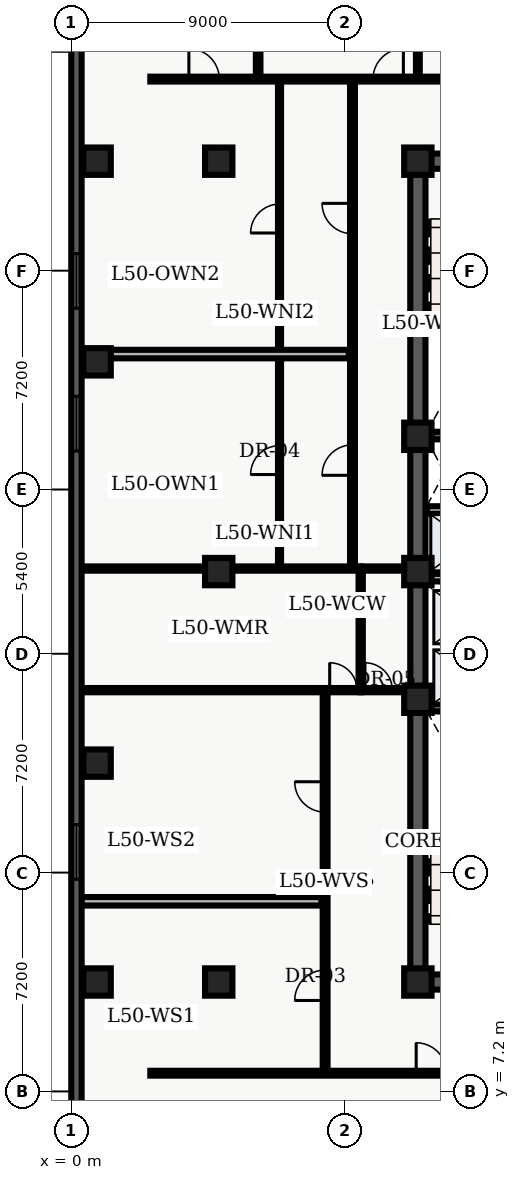
"""IFC4 building model, lengths in metres.
Left out: names, types, materials, properties, quantities, classifications, styles, units other than length and angle.
Written with IfcOpenShell. Run it as: python <this file> out.ifc"""

import sys

from ifc_helpers import new_model, entity, si_unit, converted_unit, direction, frame, origin_with_axes, origin_2d_with_axis, place, context, subcontext, project, spatial, polyline, rectangle, outline, extrude, element, fill, save


model = new_model("IFC4")
c1 = context("Model", 3, precision=1e-05, world=origin_with_axes(), true_north=direction((0.0, 1.0)))
c2 = subcontext(c1, "Body", "Model", "MODEL_VIEW")
j1 = project(units=[si_unit("LENGTHUNIT", "METRE"), converted_unit("PLANEANGLEUNIT", "DEGREE", entity("IfcPlaneAngleMeasure", 0.017), si_unit("PLANEANGLEUNIT", "RADIAN"), dimensions=[0, 0, 0, 0, 0, 0, 0])], contexts=[c1])
p1 = place(None, origin_with_axes())
s1 = spatial("IfcSite", under=j1, at=p1, CompositionType="ELEMENT")
p2 = place(p1, origin_with_axes())
s2 = spatial("IfcBuilding", under=s1, at=p2, CompositionType="ELEMENT")
p3 = place(p2, frame((0.0, 0.0, 204.3), z_axis=(0.0, 0.0, 1.0), x_axis=(1.0, 0.0, 0.0)))
s3 = spatial("IfcBuildingStorey", under=s2, at=p3, CompositionType="ELEMENT", Elevation=204.3)
p4 = place(p3, frame((11.4, 10.8, 0.0), z_axis=(0.0, 0.0, 1.0), x_axis=(0.0, 1.0, 0.0)))
e1 = element("IfcWall", 1, at=p4, inside=s3, PredefinedType="SHEAR", context=c2, shape_type="SweptSolid", body=[
    extrude(outline(polyline([(0.0, -0.25), (27.0, -0.25), (27.0, 0.25), (0.0, 0.25), (0.0, -0.25)])), origin_with_axes(), (0.0, 0.0, 1.0), 3.66),
])
p5 = place(p3, frame((11.4, 10.8, 0.0), z_axis=(0.0, 0.0, 1.0), x_axis=(1.0, 0.0, 0.0)))
e2 = element("IfcWall", 2, at=p5, inside=s3, PredefinedType="SHEAR", context=c2, shape_type="SweptSolid", body=[
    extrude(outline(polyline([(0.0, -0.25), (7.2, -0.25), (7.2, 0.25), (0.0, 0.25), (0.0, -0.25)])), origin_with_axes(), (0.0, 0.0, 1.0), 3.66),
])
p6 = place(p5, frame((2.625, 0.0, 0.0), z_axis=(0.0, 0.0, 1.0), x_axis=(1.0, 0.0, 0.0)))
e3 = element("IfcOpeningElement", 3, at=p6, cuts=e2, PredefinedType="OPENING", context=c2, shape_type="SweptSolid", body=[
    extrude(rectangle(XDim=1.05, YDim=0.52, at=origin_2d_with_axis()), origin_with_axes(), (0.0, 0.0, 1.0), 2.15),
])
p7 = place(p3, frame((11.4, 37.8, 0.0), z_axis=(0.0, 0.0, 1.0), x_axis=(1.0, 0.0, 0.0)))
e4 = element("IfcWall", 4, at=p7, inside=s3, PredefinedType="SHEAR", context=c2, shape_type="SweptSolid", body=[
    extrude(outline(polyline([(0.0, -0.25), (7.2, -0.25), (7.2, 0.25), (0.0, 0.25), (0.0, -0.25)])), origin_with_axes(), (0.0, 0.0, 1.0), 3.66),
])
p8 = place(p7, frame((2.625, 0.0, 0.0), z_axis=(0.0, 0.0, 1.0), x_axis=(1.0, 0.0, 0.0)))
e5 = element("IfcOpeningElement", 5, at=p8, cuts=e4, PredefinedType="OPENING", context=c2, shape_type="SweptSolid", body=[
    extrude(rectangle(XDim=1.05, YDim=0.52, at=origin_2d_with_axis()), origin_with_axes(), (0.0, 0.0, 1.0), 2.15),
])
for number, where, z_axis, x_axis in (
    (6, (11.65, 19.825, 0.0), (0.0, 0.0, 1.0), (1.0, 0.0, 0.0)),
    (7, (11.65, 28.775, 0.0), (0.0, 0.0, 1.0), (1.0, 0.0, 0.0)),
):
    element("IfcWall", number, at=place(p3, frame(where, z_axis=z_axis, x_axis=x_axis)), inside=s3, PredefinedType="SHEAR", context=c2, shape_type="SweptSolid", body=[
        extrude(outline(polyline([(0.0, -0.125), (6.7, -0.125), (6.7, 0.125), (0.0, 0.125), (0.0, -0.125)])), origin_with_axes(), (0.0, 0.0, 1.0), 3.66),
    ])
p9 = place(p3, frame((11.7, 24.1, 0.0), z_axis=(0.0, 0.0, 1.0), x_axis=(1.0, 0.0, 0.0)))
e8 = element("IfcWall", 8, at=p9, inside=s3, PredefinedType="SOLIDWALL", context=c2, shape_type="SweptSolid", body=[
    extrude(outline(polyline([(0.0, -0.125), (6.6, -0.125), (6.6, 0.125), (0.0, 0.125), (0.0, -0.125)])), origin_with_axes(), (0.0, 0.0, 1.0), 2.7),
])
p10 = place(p9, frame((3.6, 0.0, 0.0), z_axis=(0.0, 0.0, 1.0), x_axis=(1.0, 0.0, 0.0)))
e9 = element("IfcOpeningElement", 9, at=p10, cuts=e8, PredefinedType="OPENING", context=c2, shape_type="SweptSolid", body=[
    extrude(rectangle(XDim=0.9, YDim=0.27, at=origin_2d_with_axis()), origin_with_axes(), (0.0, 0.0, 1.0), 2.15),
])
p11 = place(p9, frame((5.65, 0.0, 0.0), z_axis=(0.0, 0.0, 1.0), x_axis=(1.0, 0.0, 0.0)))
e10 = element("IfcOpeningElement", 10, at=p11, cuts=e8, PredefinedType="OPENING", context=c2, shape_type="SweptSolid", body=[
    extrude(rectangle(XDim=0.9, YDim=0.27, at=origin_2d_with_axis()), origin_with_axes(), (0.0, 0.0, 1.0), 2.15),
])
p12 = place(p3, frame((11.7, 26.325, 0.0), z_axis=(0.0, 0.0, 1.0), x_axis=(1.0, 0.0, 0.0)))
e11 = element("IfcWall", 11, at=p12, inside=s3, PredefinedType="SOLIDWALL", context=c2, shape_type="SweptSolid", body=[
    extrude(outline(polyline([(0.0, -0.125), (6.6, -0.125), (6.6, 0.125), (0.0, 0.125), (0.0, -0.125)])), origin_with_axes(), (0.0, 0.0, 1.0), 2.7),
])
p13 = place(p12, frame((3.5, 0.0, 0.0), z_axis=(0.0, 0.0, 1.0), x_axis=(1.0, 0.0, 0.0)))
e12 = element("IfcOpeningElement", 12, at=p13, cuts=e11, PredefinedType="OPENING", context=c2, shape_type="SweptSolid", body=[
    extrude(rectangle(XDim=0.9, YDim=0.27, at=origin_2d_with_axis()), origin_with_axes(), (0.0, 0.0, 1.0), 2.15),
])
for number, where, z_axis, x_axis in (
    (13, (11.4, 10.8, 0.0), (0.0, 0.0, 1.0), (1.0, 0.0, 0.0)),
    (14, (11.4, 20.1, 0.0), (0.0, 0.0, 1.0), (1.0, 0.0, 0.0)),
    (15, (11.4, 24.3, 0.0), (0.0, 0.0, 1.0), (1.0, 0.0, 0.0)),
    (16, (11.4, 28.75, 0.0), (0.0, 0.0, 1.0), (1.0, 0.0, 0.0)),
    (17, (11.4, 37.8, 0.0), (0.0, 0.0, 1.0), (1.0, 0.0, 0.0)),
    (18, (4.85, 10.8, 0.0), (0.0, 0.0, 1.0), (1.0, 0.0, 0.0)),
    (19, (4.85, 24.3, 0.0), (0.0, 0.0, 1.0), (1.0, 0.0, 0.0)),
    (20, (4.85, 37.8, 0.0), (0.0, 0.0, 1.0), (1.0, 0.0, 0.0)),
    (21, (0.85, 10.8, 0.0), (0.0, 0.0, 1.0), (1.0, 0.0, 0.0)),
    (22, (0.85, 18.0, 0.0), (0.0, 0.0, 1.0), (1.0, 0.0, 0.0)),
    (23, (0.85, 31.2, 0.0), (0.0, 0.0, 1.0), (1.0, 0.0, 0.0)),
    (24, (0.85, 37.8, 0.0), (0.0, 0.0, 1.0), (1.0, 0.0, 0.0)),
):
    element("IfcColumn", number, at=place(p3, frame(where, z_axis=z_axis, x_axis=x_axis)), inside=s3, PredefinedType="COLUMN", context=c2, shape_type="SweptSolid", body=[
        extrude(rectangle(XDim=0.9, YDim=0.9, at=origin_2d_with_axis()), origin_with_axes(), (0.0, 0.0, 1.0), 3.9),
    ])
p14 = place(p3, frame((9.52, 20.4, 0.0), z_axis=(0.0, 0.0, 1.0), x_axis=(0.0, 1.0, 0.0)))
e25 = element("IfcWall", 25, at=p14, inside=s3, PredefinedType="PARTITIONING", context=c2, shape_type="SweptSolid", body=[
    extrude(outline(polyline([(0.0, -0.07), (4.0, -0.07), (4.0, 0.07), (0.0, 0.07), (0.0, -0.07)])), origin_with_axes(), (0.0, 0.0, 1.0), 2.7),
])
p15 = place(p3, frame((9.52, 20.4, 0.0), z_axis=(0.0, 0.0, 1.0), x_axis=(1.0, 0.0, 0.0)))
e26 = element("IfcWall", 26, at=p15, inside=s3, PredefinedType="PARTITIONING", context=c2, shape_type="SweptSolid", body=[
    extrude(outline(polyline([(0.0, -0.07), (1.58, -0.07), (1.58, 0.07), (0.0, 0.07), (0.0, -0.07)])), origin_with_axes(), (0.0, 0.0, 1.0), 2.7),
])
p16 = place(p15, frame((0.59, 0.0, 0.0), z_axis=(0.0, 0.0, 1.0), x_axis=(1.0, 0.0, 0.0)))
e27 = element("IfcOpeningElement", 27, at=p16, cuts=e26, PredefinedType="OPENING", context=c2, shape_type="SweptSolid", body=[
    extrude(rectangle(XDim=0.9, YDim=0.16, at=origin_2d_with_axis()), origin_with_axes(), (0.0, 0.0, 1.0), 2.15),
])
p17 = place(p3, frame((9.52, 24.4, 0.0), z_axis=(0.0, 0.0, 1.0), x_axis=(1.0, 0.0, 0.0)))
e28 = element("IfcWall", 28, at=p17, inside=s3, PredefinedType="PARTITIONING", context=c2, shape_type="SweptSolid", body=[
    extrude(outline(polyline([(0.0, -0.07), (1.58, -0.07), (1.58, 0.07), (0.0, 0.07), (0.0, -0.07)])), origin_with_axes(), (0.0, 0.0, 1.0), 2.7),
])
p18 = place(p3, frame((2.6, 7.8, 0.0), z_axis=(0.0, 0.0, 1.0), x_axis=(1.0, 0.0, 0.0)))
e29 = element("IfcWall", 29, at=p18, inside=s3, PredefinedType="PARTITIONING", context=c2, shape_type="SweptSolid", body=[
    extrude(outline(polyline([(0.0, -0.08), (18.55, -0.08), (18.55, 0.08), (0.0, 0.08), (0.0, -0.08)])), origin_with_axes(), (0.0, 0.0, 1.0), 2.7),
])
p19 = place(p18, frame((9.245, 0.0, 0.0), z_axis=(0.0, 0.0, 1.0), x_axis=(1.0, 0.0, 0.0)))
e30 = element("IfcOpeningElement", 30, at=p19, cuts=e29, PredefinedType="OPENING", context=c2, shape_type="SweptSolid", body=[
    extrude(rectangle(XDim=1.0, YDim=0.18, at=origin_2d_with_axis()), origin_with_axes(), (0.0, 0.0, 1.0), 2.15),
])
p20 = place(p3, frame((2.6, 40.5, 0.0), z_axis=(0.0, 0.0, 1.0), x_axis=(1.0, 0.0, 0.0)))
e31 = element("IfcWall", 31, at=p20, inside=s3, PredefinedType="PARTITIONING", context=c2, shape_type="SweptSolid", body=[
    extrude(outline(polyline([(0.0, -0.08), (26.946, -0.08), (26.946, 0.08), (0.0, 0.08), (0.0, -0.08)])), origin_with_axes(), (0.0, 0.0, 1.0), 2.7),
])
p21 = place(p20, frame((1.768, 0.0, 0.0), z_axis=(0.0, 0.0, 1.0), x_axis=(1.0, 0.0, 0.0)))
e32 = element("IfcOpeningElement", 32, at=p21, cuts=e31, PredefinedType="OPENING", context=c2, shape_type="SweptSolid", body=[
    extrude(rectangle(XDim=1.0, YDim=0.18, at=origin_2d_with_axis()), origin_with_axes(), (0.0, 0.0, 1.0), 2.15),
])
p22 = place(p20, frame((7.824, 0.0, 0.0), z_axis=(0.0, 0.0, 1.0), x_axis=(1.0, 0.0, 0.0)))
e33 = element("IfcOpeningElement", 33, at=p22, cuts=e31, PredefinedType="OPENING", context=c2, shape_type="SweptSolid", body=[
    extrude(rectangle(XDim=1.0, YDim=0.18, at=origin_2d_with_axis()), origin_with_axes(), (0.0, 0.0, 1.0), 2.15),
])
p23 = place(p20, frame((10.411, 0.0, 0.0), z_axis=(0.0, 0.0, 1.0), x_axis=(1.0, 0.0, 0.0)))
e34 = element("IfcOpeningElement", 34, at=p23, cuts=e31, PredefinedType="OPENING", context=c2, shape_type="SweptSolid", body=[
    extrude(rectangle(XDim=1.0, YDim=0.18, at=origin_2d_with_axis()), origin_with_axes(), (0.0, 0.0, 1.0), 2.15),
])
p24 = place(p20, frame((14.771, 0.0, 0.0), z_axis=(0.0, 0.0, 1.0), x_axis=(1.0, 0.0, 0.0)))
e35 = element("IfcOpeningElement", 35, at=p24, cuts=e31, PredefinedType="OPENING", context=c2, shape_type="SweptSolid", body=[
    extrude(rectangle(XDim=1.0, YDim=0.18, at=origin_2d_with_axis()), origin_with_axes(), (0.0, 0.0, 1.0), 2.15),
])
p25 = place(p3, frame((8.35, 7.8, 0.0), z_axis=(0.0, 0.0, 1.0), x_axis=(0.0, 1.0, 0.0)))
e36 = element("IfcWall", 36, at=p25, inside=s3, PredefinedType="PARTITIONING", context=c2, shape_type="SweptSolid", body=[
    extrude(outline(polyline([(0.0, -0.08), (12.6, -0.08), (12.6, 0.08), (0.0, 0.08), (0.0, -0.08)])), origin_with_axes(), (0.0, 0.0, 1.0), 2.7),
])
p26 = place(p25, frame((2.893, 0.0, 0.0), z_axis=(0.0, 0.0, 1.0), x_axis=(1.0, 0.0, 0.0)))
e37 = element("IfcOpeningElement", 37, at=p26, cuts=e36, PredefinedType="OPENING", context=c2, shape_type="SweptSolid", body=[
    extrude(rectangle(XDim=1.0, YDim=0.18, at=origin_2d_with_axis()), origin_with_axes(), (0.0, 0.0, 1.0), 2.15),
])
p27 = place(p25, frame((9.088, 0.0, 0.0), z_axis=(0.0, 0.0, 1.0), x_axis=(1.0, 0.0, 0.0)))
e38 = element("IfcOpeningElement", 38, at=p27, cuts=e36, PredefinedType="OPENING", context=c2, shape_type="SweptSolid", body=[
    extrude(rectangle(XDim=1.0, YDim=0.18, at=origin_2d_with_axis()), origin_with_axes(), (0.0, 0.0, 1.0), 2.15),
])
p28 = place(p3, frame((9.25, 24.4, 0.0), z_axis=(0.0, 0.0, 1.0), x_axis=(0.0, 1.0, 0.0)))
e39 = element("IfcWall", 39, at=p28, inside=s3, PredefinedType="PARTITIONING", context=c2, shape_type="SweptSolid", body=[
    extrude(outline(polyline([(0.0, -0.08), (16.1, -0.08), (16.1, 0.08), (0.0, 0.08), (0.0, -0.08)])), origin_with_axes(), (0.0, 0.0, 1.0), 2.7),
])
p29 = place(p28, frame((3.567, 0.0, 0.0), z_axis=(0.0, 0.0, 1.0), x_axis=(1.0, 0.0, 0.0)))
e40 = element("IfcOpeningElement", 40, at=p29, cuts=e39, PredefinedType="OPENING", context=c2, shape_type="SweptSolid", body=[
    extrude(rectangle(XDim=1.0, YDim=0.18, at=origin_2d_with_axis()), origin_with_axes(), (0.0, 0.0, 1.0), 2.15),
])
p30 = place(p28, frame((11.512, 0.0, 0.0), z_axis=(0.0, 0.0, 1.0), x_axis=(1.0, 0.0, 0.0)))
e41 = element("IfcOpeningElement", 41, at=p30, cuts=e39, PredefinedType="OPENING", context=c2, shape_type="SweptSolid", body=[
    extrude(rectangle(XDim=1.0, YDim=0.18, at=origin_2d_with_axis()), origin_with_axes(), (0.0, 0.0, 1.0), 2.15),
])
p31 = place(p3, frame((0.335, 20.4, 0.0), z_axis=(0.0, 0.0, 1.0), x_axis=(1.0, 0.0, 0.0)))
e42 = element("IfcWall", 42, at=p31, inside=s3, PredefinedType="PARTITIONING", context=c2, shape_type="SweptSolid", body=[
    extrude(outline(polyline([(0.0, -0.07), (9.185, -0.07), (9.185, 0.07), (0.0, 0.07), (0.0, -0.07)])), origin_with_axes(), (0.0, 0.0, 1.0), 2.7),
])
p32 = place(p31, frame((8.615, 0.0, 0.0), z_axis=(0.0, 0.0, 1.0), x_axis=(1.0, 0.0, 0.0)))
e43 = element("IfcOpeningElement", 43, at=p32, cuts=e42, PredefinedType="OPENING", context=c2, shape_type="SweptSolid", body=[
    extrude(rectangle(XDim=0.9, YDim=0.16, at=origin_2d_with_axis()), origin_with_axes(), (0.0, 0.0, 1.0), 2.15),
])
p33 = place(p3, frame((0.335, 24.4, 0.0), z_axis=(0.0, 0.0, 1.0), x_axis=(1.0, 0.0, 0.0)))
e44 = element("IfcWall", 44, at=p33, inside=s3, PredefinedType="PARTITIONING", context=c2, shape_type="SweptSolid", body=[
    extrude(outline(polyline([(0.0, -0.07), (9.185, -0.07), (9.185, 0.07), (0.0, 0.07), (0.0, -0.07)])), origin_with_axes(), (0.0, 0.0, 1.0), 2.7),
])
p34 = place(p3, frame((0.335, 13.455, 0.0), z_axis=(0.0, 0.0, 1.0), x_axis=(1.0, 0.0, 0.0)))
e45 = element("IfcWall", 45, at=p34, inside=s3, PredefinedType="PARTITIONING", context=c2, shape_type="SweptSolid", body=[
    extrude(outline(polyline([(0.0, -0.14), (7.895, -0.14), (7.895, 0.14), (0.0, 0.14), (0.0, -0.14)])), origin_with_axes(), (0.0, 0.0, 1.0), 2.7),
])
p35 = place(p3, frame((6.85, 24.55, 0.0), z_axis=(0.0, 0.0, 1.0), x_axis=(0.0, 1.0, 0.0)))
e46 = element("IfcWall", 46, at=p35, inside=s3, PredefinedType="PARTITIONING", context=c2, shape_type="SweptSolid", body=[
    extrude(outline(polyline([(0.0, -0.05), (15.75, -0.05), (15.75, 0.05), (0.0, 0.05), (0.0, -0.05)])), origin_with_axes(), (0.0, 0.0, 1.0), 2.7),
])
p36 = place(p35, frame((3.417, 0.0, 0.0), z_axis=(0.0, 0.0, 1.0), x_axis=(1.0, 0.0, 0.0)))
e47 = element("IfcOpeningElement", 47, at=p36, cuts=e46, PredefinedType="OPENING", context=c2, shape_type="SweptSolid", body=[
    extrude(rectangle(XDim=0.95, YDim=0.12, at=origin_2d_with_axis()), origin_with_axes(), (0.0, 0.0, 1.0), 2.15),
])
p37 = place(p35, frame((11.363, 0.0, 0.0), z_axis=(0.0, 0.0, 1.0), x_axis=(1.0, 0.0, 0.0)))
e48 = element("IfcOpeningElement", 48, at=p37, cuts=e46, PredefinedType="OPENING", context=c2, shape_type="SweptSolid", body=[
    extrude(rectangle(XDim=0.95, YDim=0.12, at=origin_2d_with_axis()), origin_with_axes(), (0.0, 0.0, 1.0), 2.15),
])
p38 = place(p3, frame((0.335, 31.455, 0.0), z_axis=(0.0, 0.0, 1.0), x_axis=(1.0, 0.0, 0.0)))
e49 = element("IfcWall", 49, at=p38, inside=s3, PredefinedType="PARTITIONING", context=c2, shape_type="SweptSolid", body=[
    extrude(outline(polyline([(0.0, -0.14), (8.795, -0.14), (8.795, 0.14), (0.0, 0.14), (0.0, -0.14)])), origin_with_axes(), (0.0, 0.0, 1.0), 2.7),
])
p39 = place(p3, frame((6.147, 40.6, 0.0), z_axis=(0.0, 0.0, 1.0), x_axis=(0.0, 1.0, 0.0)))
e50 = element("IfcWall", 50, at=p39, inside=s3, PredefinedType="PARTITIONING", context=c2, shape_type="SweptSolid", body=[
    extrude(outline(polyline([(0.0, -0.075), (7.665, -0.075), (7.665, 0.075), (0.0, 0.075), (0.0, -0.075)])), origin_with_axes(), (0.0, 0.0, 1.0), 2.7),
])
p40 = place(p3, frame((11.4, 40.6, 0.0), z_axis=(0.0, 0.0, 1.0), x_axis=(0.0, 1.0, 0.0)))
e51 = element("IfcWall", 51, at=p40, inside=s3, PredefinedType="PARTITIONING", context=c2, shape_type="SweptSolid", body=[
    extrude(outline(polyline([(0.0, -0.062), (7.665, -0.062), (7.665, 0.062), (0.0, 0.062), (0.0, -0.062)])), origin_with_axes(), (0.0, 0.0, 1.0), 2.7),
])
p41 = place(p3, frame((0.17, 2.74, 0.0), z_axis=(0.0, 0.0, 1.0), x_axis=(0.0, 1.0, 0.0)))
e52 = element("IfcWall", 52, at=p41, inside=s3, PredefinedType="SOLIDWALL", context=c2, shape_type="SweptSolid", body=[
    extrude(outline(polyline([(0.0, -0.17), (43.46, -0.17), (43.46, 0.17), (0.0, 0.17), (0.0, -0.17)])), origin_with_axes(), (0.0, 0.0, 1.0), 3.66),
])
p42 = place(p41, frame((2.948, 0.0, 0.45), z_axis=(0.0, 0.0, 1.0), x_axis=(1.0, 0.0, 0.0)))
e53 = element("IfcOpeningElement", 53, at=p42, cuts=e52, PredefinedType="OPENING", context=c2, shape_type="SweptSolid", body=[
    extrude(rectangle(XDim=1.8, YDim=0.36, at=origin_2d_with_axis()), origin_with_axes(), (0.0, 0.0, 1.0), 2.1),
])
p43 = place(p41, frame((12.339, 0.0, 0.45), z_axis=(0.0, 0.0, 1.0), x_axis=(1.0, 0.0, 0.0)))
e54 = element("IfcOpeningElement", 54, at=p43, cuts=e52, PredefinedType="OPENING", context=c2, shape_type="SweptSolid", body=[
    extrude(rectangle(XDim=1.8, YDim=0.36, at=origin_2d_with_axis()), origin_with_axes(), (0.0, 0.0, 1.0), 2.1),
])
p44 = place(p41, frame((26.426, 0.0, 0.45), z_axis=(0.0, 0.0, 1.0), x_axis=(1.0, 0.0, 0.0)))
e55 = element("IfcOpeningElement", 55, at=p44, cuts=e52, PredefinedType="OPENING", context=c2, shape_type="SweptSolid", body=[
    extrude(rectangle(XDim=1.8, YDim=0.36, at=origin_2d_with_axis()), origin_with_axes(), (0.0, 0.0, 1.0), 2.1),
])
p45 = place(p41, frame((31.121, 0.0, 0.45), z_axis=(0.0, 0.0, 1.0), x_axis=(1.0, 0.0, 0.0)))
e56 = element("IfcOpeningElement", 56, at=p45, cuts=e52, PredefinedType="OPENING", context=c2, shape_type="SweptSolid", body=[
    extrude(rectangle(XDim=1.8, YDim=0.36, at=origin_2d_with_axis()), origin_with_axes(), (0.0, 0.0, 1.0), 2.1),
])
p46 = place(p41, frame((40.062, 0.0, 0.45), z_axis=(0.0, 0.0, 1.0), x_axis=(1.0, 0.0, 0.0)))
e57 = element("IfcOpeningElement", 57, at=p46, cuts=e52, PredefinedType="OPENING", context=c2, shape_type="SweptSolid", body=[
    extrude(rectangle(XDim=1.8, YDim=0.36, at=origin_2d_with_axis()), origin_with_axes(), (0.0, 0.0, 1.0), 2.1),
])
p47 = place(p15, frame((0.59, 0.0, 0.0), z_axis=(0.0, 0.0, 1.0), x_axis=(1.0, 0.0, 0.0)))
e58 = element("IfcDoor", 58, at=p47, inside=s3, OperationType="SINGLE_SWING_LEFT", PredefinedType="DOOR", context=c2, shape_type="SweptSolid", body=[
    extrude(rectangle(XDim=0.9, YDim=0.084, at=origin_2d_with_axis()), origin_with_axes(), (0.0, 0.0, 1.0), 2.15),
])
fill(e27, e58)
p48 = place(p31, frame((8.615, 0.0, 0.0), z_axis=(0.0, 0.0, 1.0), x_axis=(1.0, 0.0, 0.0)))
e59 = element("IfcDoor", 59, at=p48, inside=s3, OperationType="SINGLE_SWING_LEFT", PredefinedType="DOOR", context=c2, shape_type="SweptSolid", body=[
    extrude(rectangle(XDim=0.9, YDim=0.084, at=origin_2d_with_axis()), origin_with_axes(), (0.0, 0.0, 1.0), 2.15),
])
fill(e43, e59)
p49 = place(p25, frame((2.893, 0.0, 0.0), z_axis=(0.0, 0.0, 1.0), x_axis=(1.0, 0.0, 0.0)))
e60 = element("IfcDoor", 60, at=p49, inside=s3, OperationType="SINGLE_SWING_LEFT", PredefinedType="DOOR", context=c2, shape_type="SweptSolid", body=[
    extrude(rectangle(XDim=1.0, YDim=0.09, at=origin_2d_with_axis()), origin_with_axes(), (0.0, 0.0, 1.0), 2.15),
])
fill(e37, e60)
p50 = place(p25, frame((9.088, 0.0, 0.0), z_axis=(0.0, 0.0, 1.0), x_axis=(1.0, 0.0, 0.0)))
e61 = element("IfcDoor", 61, at=p50, inside=s3, OperationType="SINGLE_SWING_RIGHT", PredefinedType="DOOR", context=c2, shape_type="SweptSolid", body=[
    extrude(rectangle(XDim=1.0, YDim=0.09, at=origin_2d_with_axis()), origin_with_axes(), (0.0, 0.0, 1.0), 2.15),
])
fill(e38, e61)
p51 = place(p35, frame((3.417, 0.0, 0.0), z_axis=(0.0, 0.0, 1.0), x_axis=(1.0, 0.0, 0.0)))
e62 = element("IfcDoor", 62, at=p51, inside=s3, OperationType="SINGLE_SWING_LEFT", PredefinedType="DOOR", context=c2, shape_type="SweptSolid", body=[
    extrude(rectangle(XDim=0.95, YDim=0.06, at=origin_2d_with_axis()), origin_with_axes(), (0.0, 0.0, 1.0), 2.15),
])
fill(e47, e62)
p52 = place(p28, frame((3.567, 0.0, 0.0), z_axis=(0.0, 0.0, 1.0), x_axis=(1.0, 0.0, 0.0)))
e63 = element("IfcDoor", 63, at=p52, inside=s3, OperationType="SINGLE_SWING_LEFT", PredefinedType="DOOR", context=c2, shape_type="SweptSolid", body=[
    extrude(rectangle(XDim=1.0, YDim=0.09, at=origin_2d_with_axis()), origin_with_axes(), (0.0, 0.0, 1.0), 2.15),
])
fill(e40, e63)
p53 = place(p35, frame((11.363, 0.0, 0.0), z_axis=(0.0, 0.0, 1.0), x_axis=(1.0, 0.0, 0.0)))
e64 = element("IfcDoor", 64, at=p53, inside=s3, OperationType="SINGLE_SWING_LEFT", PredefinedType="DOOR", context=c2, shape_type="SweptSolid", body=[
    extrude(rectangle(XDim=0.95, YDim=0.06, at=origin_2d_with_axis()), origin_with_axes(), (0.0, 0.0, 1.0), 2.15),
])
fill(e48, e64)
p54 = place(p28, frame((11.512, 0.0, 0.0), z_axis=(0.0, 0.0, 1.0), x_axis=(1.0, 0.0, 0.0)))
e65 = element("IfcDoor", 65, at=p54, inside=s3, OperationType="SINGLE_SWING_RIGHT", PredefinedType="DOOR", context=c2, shape_type="SweptSolid", body=[
    extrude(rectangle(XDim=1.0, YDim=0.09, at=origin_2d_with_axis()), origin_with_axes(), (0.0, 0.0, 1.0), 2.15),
])
fill(e41, e65)
p55 = place(p18, frame((9.245, 0.0, 0.0), z_axis=(0.0, 0.0, 1.0), x_axis=(1.0, 0.0, 0.0)))
e66 = element("IfcDoor", 66, at=p55, inside=s3, OperationType="SINGLE_SWING_LEFT", PredefinedType="DOOR", context=c2, shape_type="SweptSolid", body=[
    extrude(rectangle(XDim=1.0, YDim=0.09, at=origin_2d_with_axis()), origin_with_axes(), (0.0, 0.0, 1.0), 2.15),
])
fill(e30, e66)
p56 = place(p20, frame((1.768, 0.0, 0.0), z_axis=(0.0, 0.0, 1.0), x_axis=(1.0, 0.0, 0.0)))
e67 = element("IfcDoor", 67, at=p56, inside=s3, OperationType="SINGLE_SWING_LEFT", PredefinedType="DOOR", context=c2, shape_type="SweptSolid", body=[
    extrude(rectangle(XDim=1.0, YDim=0.09, at=origin_2d_with_axis()), origin_with_axes(), (0.0, 0.0, 1.0), 2.15),
])
fill(e32, e67)
p57 = place(p20, frame((7.824, 0.0, 0.0), z_axis=(0.0, 0.0, 1.0), x_axis=(1.0, 0.0, 0.0)))
e68 = element("IfcDoor", 68, at=p57, inside=s3, OperationType="SINGLE_SWING_RIGHT", PredefinedType="DOOR", context=c2, shape_type="SweptSolid", body=[
    extrude(rectangle(XDim=1.0, YDim=0.09, at=origin_2d_with_axis()), origin_with_axes(), (0.0, 0.0, 1.0), 2.15),
])
fill(e33, e68)
p58 = place(p41, frame((12.339, 0.0, 0.45), z_axis=(0.0, 0.0, 1.0), x_axis=(1.0, 0.0, 0.0)))
e69 = element("IfcWindow", 69, at=p58, inside=s3, PredefinedType="WINDOW", context=c2, shape_type="SweptSolid", body=[
    extrude(rectangle(XDim=1.8, YDim=0.09, at=origin_2d_with_axis()), origin_with_axes(), (0.0, 0.0, 1.0), 2.1),
])
fill(e54, e69)
p59 = place(p41, frame((26.426, 0.0, 0.45), z_axis=(0.0, 0.0, 1.0), x_axis=(1.0, 0.0, 0.0)))
e70 = element("IfcWindow", 70, at=p59, inside=s3, PredefinedType="WINDOW", context=c2, shape_type="SweptSolid", body=[
    extrude(rectangle(XDim=1.8, YDim=0.09, at=origin_2d_with_axis()), origin_with_axes(), (0.0, 0.0, 1.0), 2.1),
])
fill(e55, e70)
p60 = place(p41, frame((31.121, 0.0, 0.45), z_axis=(0.0, 0.0, 1.0), x_axis=(1.0, 0.0, 0.0)))
e71 = element("IfcWindow", 71, at=p60, inside=s3, PredefinedType="WINDOW", context=c2, shape_type="SweptSolid", body=[
    extrude(rectangle(XDim=1.8, YDim=0.09, at=origin_2d_with_axis()), origin_with_axes(), (0.0, 0.0, 1.0), 2.1),
])
fill(e56, e71)
save(model, sys.argv[1])
